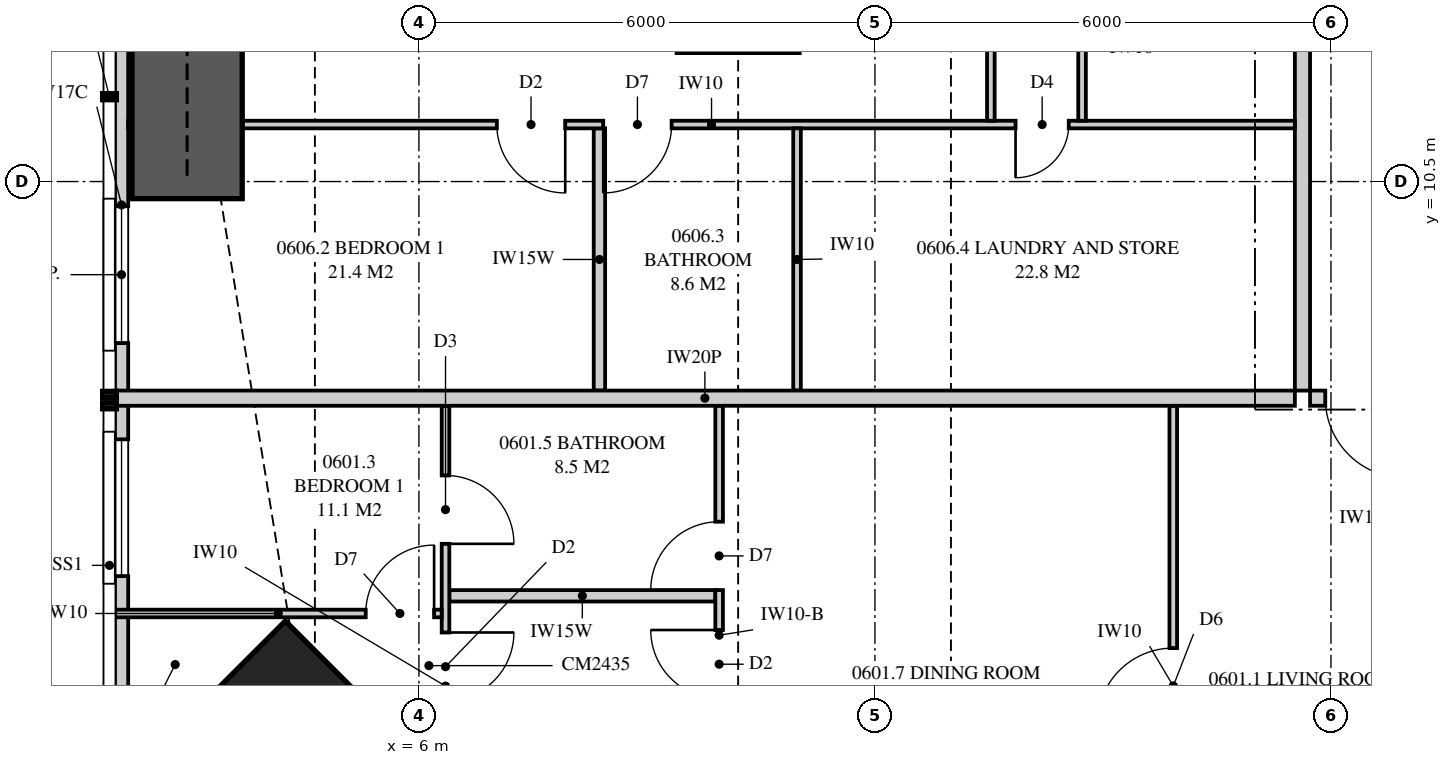
"""IFC4 building model, lengths in metres.
Left out: names, types, materials, properties, quantities, classifications, styles, units other than length and angle.
Written with IfcOpenShell. Run it as: python <this file> out.ifc"""

import sys

from ifc_helpers import new_model, si_unit, direction, frame, frame_2d, origin, origin_2d, place, context, subcontext, project, spatial, polyline, rectangle, outline, extrude, element, fill, save


model = new_model("IFC4")
c1 = context("Model", 3, precision=1e-05, world=origin(), true_north=direction((0.0, 1.0)))
c2 = subcontext(c1, "Body", "Model", "MODEL_VIEW")
j1 = project(units=[si_unit("LENGTHUNIT", "METRE"), si_unit("PLANEANGLEUNIT", "RADIAN")], contexts=[c1])
p1 = place(None, origin())
s1 = spatial("IfcSite", under=j1, at=p1, CompositionType="ELEMENT")
p2 = place(p1, origin())
s2 = spatial("IfcBuilding", under=s1, at=p2, CompositionType="ELEMENT")
p3 = place(p2, frame((0.0, 0.0, 27.7)))
s3 = spatial("IfcBuildingStorey", under=s2, at=p3, CompositionType="ELEMENT", Elevation=27.7)
p4 = place(p3, frame((4.631, 2.631, 0.0), z_axis=(0.0, 0.0, 1.0), x_axis=(0.707106781187, 0.707106781187, 0.0)))
e1 = element("IfcColumn", 1, at=p4, inside=s3, PredefinedType="COLUMN", context=c2, shape_type="SweptSolid", body=[
    extrude(rectangle(XDim=2.4, YDim=3.5, at=origin_2d()), origin(), (0.0, 0.0, 1.0), 3.35),
])
p5 = place(p3, frame((2.087, 17.333, 0.0), z_axis=(0.0, 0.0, 1.0), x_axis=(0.0, -1.0, 0.0)))
e2 = element("IfcWall", 2, at=p5, inside=s3, PredefinedType="SOLIDWALL", context=c2, shape_type="SweptSolid", body=[
    extrude(outline(polyline([(0.0, 0.0), (14.282, 0.0), (14.282, 3.11), (4.552, 3.11), (4.552, 2.15), (4.459, 2.15), (4.459, 3.11), (4.333, 3.11), (4.333, 2.15), (0.0, 2.15), (0.0, 0.0)])), frame((0.0, 0.087, 0.0), z_axis=(0.0, -1.0, 0.0), x_axis=(1.0, 0.0, 0.0)), (0.0, 0.0, 1.0), 0.175),
])
p6 = place(p5, frame((0.3, 0.0, 0.4)))
e3 = element("IfcOpeningElement", 3, at=p6, cuts=e2, PredefinedType="OPENING", context=c2, shape_type="SweptSolid", body=[
    extrude(rectangle(XDim=1.2, YDim=1.7, at=frame_2d((0.6, 0.85))), frame((0.0, 0.097, 0.0), z_axis=(0.0, -1.0, 0.0), x_axis=(1.0, 0.0, 0.0)), (0.0, 0.0, 1.0), 0.195),
])
p7 = place(p5, frame((7.158, 0.0, 0.4)))
e4 = element("IfcOpeningElement", 4, at=p7, cuts=e2, PredefinedType="OPENING", context=c2, shape_type="SweptSolid", body=[
    extrude(rectangle(XDim=1.8, YDim=1.7, at=frame_2d((0.9, 0.85))), frame((0.0, 0.097, 0.0), z_axis=(0.0, -1.0, 0.0), x_axis=(1.0, 0.0, 0.0)), (0.0, 0.0, 1.0), 0.195),
])
p8 = place(p5, frame((10.225, 0.0, 0.4)))
e5 = element("IfcOpeningElement", 5, at=p8, cuts=e2, PredefinedType="OPENING", context=c2, shape_type="SweptSolid", body=[
    extrude(rectangle(XDim=1.8, YDim=1.7, at=frame_2d((0.9, 0.85))), frame((0.0, 0.097, 0.0), z_axis=(0.0, -1.0, 0.0), x_axis=(1.0, 0.0, 0.0)), (0.0, 0.0, 1.0), 0.195),
])
p9 = place(p3, frame((17.725, 7.65, 0.0), z_axis=(0.0, 0.0, 1.0), x_axis=(1.0, 0.0, 0.0)))
e6 = element("IfcWall", 6, at=p9, inside=s3, PredefinedType="PARTITIONING", context=c2, shape_type="SweptSolid", body=[
    extrude(rectangle(XDim=4.125, YDim=0.2, at=frame_2d((2.062, 0.0))), origin(), (0.0, 0.0, 1.0), 3.11),
])
p10 = place(p9, frame((0.2, 0.0, 0.0)))
e7 = element("IfcOpeningElement", 7, at=p10, cuts=e6, PredefinedType="OPENING", context=c2, shape_type="SweptSolid", body=[
    extrude(rectangle(XDim=1.05, YDim=2.2, at=frame_2d((0.525, 1.1))), frame((0.0, 0.11, 0.0), z_axis=(0.0, -1.0, 0.0), x_axis=(1.0, 0.0, 0.0)), (0.0, 0.0, 1.0), 0.22),
])
p11 = place(p3, frame((6.35, 0.175, 0.0), z_axis=(0.0, 0.0, 1.0), x_axis=(0.0, 1.0, 0.0)))
e8 = element("IfcWall", 8, at=p11, inside=s3, PredefinedType="PARTITIONING", context=c2, shape_type="SweptSolid", body=[
    extrude(outline(polyline([(0.0, 0.0), (7.375, 0.0), (7.375, 3.11), (2.988, 3.11), (2.988, 2.15), (1.234, 2.15), (1.234, 3.11), (0.0, 3.11), (0.0, 0.0)])), frame((0.0, 0.05, 0.0), z_axis=(0.0, -1.0, 0.0), x_axis=(1.0, 0.0, 0.0)), (0.0, 0.0, 1.0), 0.1),
])
p12 = place(p11, frame((3.492, 0.0, 0.0)))
e9 = element("IfcOpeningElement", 9, at=p12, cuts=e8, PredefinedType="OPENING", context=c2, shape_type="SweptSolid", body=[
    extrude(rectangle(XDim=0.9, YDim=2.1, at=frame_2d((0.45, 1.05))), frame((0.0, 0.06, 0.0), z_axis=(0.0, -1.0, 0.0), x_axis=(1.0, 0.0, 0.0)), (0.0, 0.0, 1.0), 0.12),
])
p13 = place(p11, frame((5.559, 0.0, 0.0)))
e10 = element("IfcOpeningElement", 10, at=p13, cuts=e8, PredefinedType="OPENING", context=c2, shape_type="SweptSolid", body=[
    extrude(rectangle(XDim=0.9, YDim=2.1, at=frame_2d((0.45, 1.05))), frame((0.0, 0.06, 0.0), z_axis=(0.0, -1.0, 0.0), x_axis=(1.0, 0.0, 0.0)), (0.0, 0.0, 1.0), 0.12),
])
p14 = place(p3, frame((9.95, 1.513, 0.0), z_axis=(0.0, 0.0, 1.0), x_axis=(0.0, 1.0, 0.0)))
e11 = element("IfcWall", 11, at=p14, inside=s3, PredefinedType="PARTITIONING", context=c2, shape_type="SweptSolid", body=[
    extrude(outline(polyline([(0.0, 0.0), (6.037, 0.0), (6.037, 2.51), (0.927, 2.51), (0.927, 2.15), (0.0, 2.15), (0.0, 0.0)])), frame((0.0, 0.05, 0.0), z_axis=(0.0, -1.0, 0.0), x_axis=(1.0, 0.0, 0.0)), (0.0, 0.0, 1.0), 0.1),
])
p15 = place(p14, frame((2.188, 0.0, 0.0)))
e12 = element("IfcOpeningElement", 12, at=p15, cuts=e11, PredefinedType="OPENING", context=c2, shape_type="SweptSolid", body=[
    extrude(rectangle(XDim=0.9, YDim=2.1, at=frame_2d((0.45, 1.05))), frame((0.0, 0.06, 0.0), z_axis=(0.0, -1.0, 0.0), x_axis=(1.0, 0.0, 0.0)), (0.0, 0.0, 1.0), 0.12),
])
p16 = place(p14, frame((3.612, 0.0, 0.0)))
e13 = element("IfcOpeningElement", 13, at=p16, cuts=e11, PredefinedType="OPENING", context=c2, shape_type="SweptSolid", body=[
    extrude(rectangle(XDim=0.9, YDim=2.1, at=frame_2d((0.45, 1.05))), frame((0.0, 0.06, 0.0), z_axis=(0.0, -1.0, 0.0), x_axis=(1.0, 0.0, 0.0)), (0.0, 0.0, 1.0), 0.12),
])
p17 = place(p3, frame((2.0, 4.817, 0.0), z_axis=(0.0, 0.0, 1.0), x_axis=(1.0, 0.0, 0.0)))
e14 = element("IfcWall", 14, at=p17, inside=s3, PredefinedType="PARTITIONING", context=c2, shape_type="SweptSolid", body=[
    extrude(outline(polyline([(0.0, 0.0), (4.3, 0.0), (4.3, 3.11), (3.148, 3.11), (3.148, 2.15), (1.406, 2.15), (1.406, 3.11), (0.0, 3.11), (0.0, 0.0)])), frame((0.0, 0.05, 0.0), z_axis=(0.0, -1.0, 0.0), x_axis=(1.0, 0.0, 0.0)), (0.0, 0.0, 1.0), 0.1),
])
p18 = place(p17, frame((3.3, 0.0, 0.0)))
e15 = element("IfcOpeningElement", 15, at=p18, cuts=e14, PredefinedType="OPENING", context=c2, shape_type="SweptSolid", body=[
    extrude(rectangle(XDim=0.9, YDim=2.1, at=frame_2d((0.45, 1.05))), frame((0.0, 0.06, 0.0), z_axis=(0.0, -1.0, 0.0), x_axis=(1.0, 0.0, 0.0)), (0.0, 0.0, 1.0), 0.12),
])
p19 = place(p3, frame((6.4, 5.05, 0.0), z_axis=(0.0, 0.0, 1.0), x_axis=(1.0, 0.0, 0.0)))
e16 = element("IfcWall", 16, at=p19, inside=s3, PredefinedType="PLUMBINGWALL", context=c2, shape_type="SweptSolid", body=[
    extrude(outline(polyline([(0.0, 0.0), (3.5, 0.0), (3.5, 3.11), (3.5, 2.51), (2.515, 2.51), (2.515, 3.11), (0.0, 3.11), (0.0, 0.0)])), frame((0.0, 0.075, 0.0), z_axis=(0.0, -1.0, 0.0), x_axis=(1.0, 0.0, 0.0)), (0.0, 0.0, 1.0), 0.15),
])
p20 = place(p3, frame((15.925, 0.175, 0.0), z_axis=(0.0, 0.0, 1.0), x_axis=(0.0, 1.0, 0.0)))
e17 = element("IfcWall", 17, at=p20, inside=s3, PredefinedType="PARTITIONING", context=c2, shape_type="SweptSolid", body=[
    extrude(outline(polyline([(0.0, 0.0), (7.375, 0.0), (7.375, 3.11), (1.635, 3.11), (1.635, 2.15), (0.0, 2.15), (0.0, 3.11), (0.0, 0.0)])), frame((0.0, 0.05, 0.0), z_axis=(0.0, -1.0, 0.0), x_axis=(1.0, 0.0, 0.0)), (0.0, 0.0, 1.0), 0.1),
])
p21 = place(p20, frame((3.188, 0.0, 0.0)))
e18 = element("IfcOpeningElement", 18, at=p21, cuts=e17, PredefinedType="OPENING", context=c2, shape_type="SweptSolid", body=[
    extrude(rectangle(XDim=1.0, YDim=2.1, at=frame_2d((0.5, 1.05))), frame((0.0, 0.06, 0.0), z_axis=(0.0, -1.0, 0.0), x_axis=(1.0, 0.0, 0.0)), (0.0, 0.0, 1.0), 0.12),
])
p22 = place(p3, frame((2.0, 7.65, 0.0), z_axis=(0.0, 0.0, 1.0), x_axis=(1.0, 0.0, 0.0)))
e19 = element("IfcWall", 19, at=p22, inside=s3, PredefinedType="PARTITIONING", context=c2, shape_type="SweptSolid", body=[
    extrude(outline(polyline([(0.0, 0.0), (15.525, 0.0), (15.525, 3.11), (11.337, 3.11), (11.337, 2.541), (10.663, 2.541), (10.663, 3.11), (9.51, 3.11), (9.51, 2.51), (6.89, 2.51), (6.89, 3.11), (2.969, 3.11), (2.969, 2.541), (2.74, 2.541), (2.74, 2.15), (0.896, 2.15), (0.896, 3.11), (0.0, 3.11), (0.0, 0.0)])), frame((0.0, 0.1, 0.0), z_axis=(0.0, -1.0, 0.0), x_axis=(1.0, 0.0, 0.0)), (0.0, 0.0, 1.0), 0.2),
])
p23 = place(p3, frame((17.625, 7.75, 0.0), z_axis=(0.0, 0.0, 1.0), x_axis=(0.0, 1.0, 0.0)))
e20 = element("IfcWall", 20, at=p23, inside=s3, PredefinedType="PARTITIONING", context=c2, shape_type="SweptSolid", body=[
    extrude(outline(polyline([(0.0, 0.0), (9.35, 0.0), (9.35, 3.11), (5.587, 3.11), (5.587, 2.541), (4.913, 2.541), (4.913, 3.11), (0.0, 3.11), (0.0, 0.0)])), frame((0.0, 0.1, 0.0), z_axis=(0.0, -1.0, 0.0), x_axis=(1.0, 0.0, 0.0)), (0.0, 0.0, 1.0), 0.2),
])
p24 = place(p3, frame((2.175, 11.25, 0.0), z_axis=(0.0, 0.0, 1.0), x_axis=(1.0, 0.0, 0.0)))
e21 = element("IfcWall", 21, at=p24, inside=s3, PredefinedType="PARTITIONING", context=c2, shape_type="SweptSolid", body=[
    extrude(outline(polyline([(0.188, 3.11), (0.0, 3.11), (0.0, 0.0), (0.529, 0.0), (0.529, 0.263), (1.021, 0.263), (1.021, 0.0), (15.35, 0.0), (15.35, 3.11), (11.112, 3.11), (11.112, 2.541), (10.538, 2.541), (10.538, 3.11), (9.285, 3.11), (9.285, 2.51), (6.765, 2.51), (6.765, 3.11), (2.744, 3.11), (2.744, 2.541), (2.169, 2.541), (2.169, 3.11), (1.93, 3.11), (1.93, 2.15), (1.021, 2.15), (1.021, 1.887), (0.529, 1.887), (0.529, 2.15), (0.188, 2.15), (0.188, 3.11)])), frame((0.0, 0.05, 0.0), z_axis=(0.0, -1.0, 0.0), x_axis=(1.0, 0.0, 0.0)), (0.0, 0.0, 1.0), 0.1),
])
p25 = place(p24, frame((4.85, 0.0, 0.0)))
e22 = element("IfcOpeningElement", 22, at=p25, cuts=e21, PredefinedType="OPENING", context=c2, shape_type="SweptSolid", body=[
    extrude(rectangle(XDim=0.9, YDim=2.1, at=frame_2d((0.45, 1.05))), frame((0.0, 0.06, 0.0), z_axis=(0.0, -1.0, 0.0), x_axis=(1.0, 0.0, 0.0)), (0.0, 0.0, 1.0), 0.12),
])
p26 = place(p24, frame((6.25, 0.0, 0.0)))
e23 = element("IfcOpeningElement", 23, at=p26, cuts=e21, PredefinedType="OPENING", context=c2, shape_type="SweptSolid", body=[
    extrude(rectangle(XDim=0.9, YDim=2.1, at=frame_2d((0.45, 1.05))), frame((0.0, 0.06, 0.0), z_axis=(0.0, -1.0, 0.0), x_axis=(1.0, 0.0, 0.0)), (0.0, 0.0, 1.0), 0.12),
])
p27 = place(p24, frame((11.675, 0.0, 0.0)))
e24 = element("IfcOpeningElement", 24, at=p27, cuts=e21, PredefinedType="OPENING", context=c2, shape_type="SweptSolid", body=[
    extrude(rectangle(XDim=0.7, YDim=2.1, at=frame_2d((0.35, 1.05))), frame((0.0, 0.06, 0.0), z_axis=(0.0, -1.0, 0.0), x_axis=(1.0, 0.0, 0.0)), (0.0, 0.0, 1.0), 0.12),
])
p28 = place(p3, frame((8.375, 7.75, 0.0), z_axis=(0.0, 0.0, 1.0), x_axis=(0.0, 1.0, 0.0)))
e25 = element("IfcWall", 25, at=p28, inside=s3, PredefinedType="PLUMBINGWALL", context=c2, shape_type="SweptSolid", body=[
    extrude(rectangle(XDim=3.45, YDim=0.15, at=frame_2d((1.725, 0.0))), origin(), (0.0, 0.0, 1.0), 3.11),
])
p29 = place(p3, frame((10.975, 7.75, 0.0), z_axis=(0.0, 0.0, 1.0), x_axis=(0.0, 1.0, 0.0)))
e26 = element("IfcWall", 26, at=p29, inside=s3, PredefinedType="PARTITIONING", context=c2, shape_type="SweptSolid", body=[
    extrude(outline(polyline([(0.0, 0.0), (3.45, 0.0), (3.45, 3.11), (3.45, 2.51), (0.0, 2.51), (0.0, 3.11), (0.0, 0.0)])), frame((0.0, 0.05, 0.0), z_axis=(0.0, -1.0, 0.0), x_axis=(1.0, 0.0, 0.0)), (0.0, 0.0, 1.0), 0.1),
])
p30 = place(p3, frame((13.525, 11.3, 0.0), z_axis=(0.0, 0.0, 1.0), x_axis=(0.0, 1.0, 0.0)))
e27 = element("IfcWall", 27, at=p30, inside=s3, PredefinedType="PARTITIONING", context=c2, shape_type="SweptSolid", body=[
    extrude(outline(polyline([(0.0, 0.0), (17.95, 0.0), (17.95, 3.11), (13.987, 3.11), (13.987, 2.541), (13.413, 2.541), (13.413, 3.11), (1.987, 3.11), (1.987, 2.541), (1.413, 2.541), (1.413, 3.11), (0.0, 3.11), (0.0, 0.0)])), frame((0.0, 0.05, 0.0), z_axis=(0.0, -1.0, 0.0), x_axis=(1.0, 0.0, 0.0)), (0.0, 0.0, 1.0), 0.1),
])
p31 = place(p30, frame((6.7, 0.0, 0.0)))
e28 = element("IfcOpeningElement", 28, at=p31, cuts=e27, PredefinedType="OPENING", context=c2, shape_type="SweptSolid", body=[
    extrude(rectangle(XDim=1.0, YDim=2.1, at=frame_2d((0.5, 1.05))), frame((0.0, 0.06, 0.0), z_axis=(0.0, -1.0, 0.0), x_axis=(1.0, 0.0, 0.0)), (0.0, 0.0, 1.0), 0.12),
])
p32 = place(p3, frame((14.725, 11.3, 0.0), z_axis=(0.0, 0.0, 1.0), x_axis=(0.0, 1.0, 0.0)))
e29 = element("IfcWall", 29, at=p32, inside=s3, PredefinedType="PARTITIONING", context=c2, shape_type="SweptSolid", body=[
    extrude(outline(polyline([(0.0, 0.0), (4.15, 0.0), (4.15, 3.11), (1.987, 3.11), (1.987, 2.541), (1.413, 2.541), (1.413, 3.11), (0.0, 3.11), (0.0, 0.0)])), frame((0.0, 0.05, 0.0), z_axis=(0.0, -1.0, 0.0), x_axis=(1.0, 0.0, 0.0)), (0.0, 0.0, 1.0), 0.1),
])
p33 = place(p3, frame((2.95, 10.275, 0.0), z_axis=(0.0, 0.0, 1.0), x_axis=(0.0, 1.0, 0.0)))
e30 = element("IfcWall", 30, at=p33, inside=s3, PredefinedType="SHEAR", context=c2, shape_type="SweptSolid", body=[
    extrude(rectangle(XDim=5.45, YDim=1.45, at=frame_2d((2.725, 0.0))), origin(), (0.0, 0.0, 1.0), 3.35),
])
p34 = place(p7, origin())
e31 = element("IfcWindow", 31, at=p34, inside=s3, PartitioningType="SINGLE_PANEL", PredefinedType="WINDOW", context=c2, shape_type="SweptSolid", body=[
    extrude(rectangle(XDim=1.8, YDim=1.7, at=frame_2d((0.9, 0.85))), frame((0.0, 0.03, 0.0), z_axis=(0.0, -1.0, 0.0), x_axis=(1.0, 0.0, 0.0)), (0.0, 0.0, 1.0), 0.06),
])
fill(e4, e31)
p35 = place(p8, origin())
e32 = element("IfcWindow", 32, at=p35, inside=s3, PartitioningType="SINGLE_PANEL", PredefinedType="WINDOW", context=c2, shape_type="SweptSolid", body=[
    extrude(rectangle(XDim=1.8, YDim=1.7, at=frame_2d((0.9, 0.85))), frame((0.0, 0.03, 0.0), z_axis=(0.0, -1.0, 0.0), x_axis=(1.0, 0.0, 0.0)), (0.0, 0.0, 1.0), 0.06),
])
fill(e5, e32)
p36 = place(p10, frame((1.05, 0.0, 0.0), z_axis=(0.0, 0.0, 1.0), x_axis=(-1.0, 0.0, 0.0)))
e33 = element("IfcDoor", 33, at=p36, inside=s3, OperationType="SINGLE_SWING_LEFT", PredefinedType="DOOR", context=c2, shape_type="SweptSolid", body=[
    extrude(rectangle(XDim=1.05, YDim=2.2, at=frame_2d((0.525, 1.1))), frame((0.0, 0.025, 0.0), z_axis=(0.0, -1.0, 0.0), x_axis=(1.0, 0.0, 0.0)), (0.0, 0.0, 1.0), 0.05),
])
fill(e7, e33)
p37 = place(p18, origin())
e34 = element("IfcDoor", 34, at=p37, inside=s3, OperationType="SINGLE_SWING_RIGHT", PredefinedType="DOOR", context=c2, shape_type="SweptSolid", body=[
    extrude(rectangle(XDim=0.9, YDim=2.1, at=frame_2d((0.45, 1.05))), frame((0.0, 0.025, 0.0), z_axis=(0.0, -1.0, 0.0), x_axis=(1.0, 0.0, 0.0)), (0.0, 0.0, 1.0), 0.05),
])
fill(e15, e34)
p38 = place(p12, frame((0.9, 0.0, 0.0), z_axis=(0.0, 0.0, 1.0), x_axis=(-1.0, 0.0, 0.0)))
e35 = element("IfcDoor", 35, at=p38, inside=s3, OperationType="SINGLE_SWING_LEFT", PredefinedType="DOOR", context=c2, shape_type="SweptSolid", body=[
    extrude(rectangle(XDim=0.9, YDim=2.1, at=frame_2d((0.45, 1.05))), frame((0.0, 0.025, 0.0), z_axis=(0.0, -1.0, 0.0), x_axis=(1.0, 0.0, 0.0)), (0.0, 0.0, 1.0), 0.05),
])
fill(e9, e35)
p39 = place(p15, origin())
e36 = element("IfcDoor", 36, at=p39, inside=s3, OperationType="SINGLE_SWING_RIGHT", PredefinedType="DOOR", context=c2, shape_type="SweptSolid", body=[
    extrude(rectangle(XDim=0.9, YDim=2.1, at=frame_2d((0.45, 1.05))), frame((0.0, 0.025, 0.0), z_axis=(0.0, -1.0, 0.0), x_axis=(1.0, 0.0, 0.0)), (0.0, 0.0, 1.0), 0.05),
])
fill(e12, e36)
p40 = place(p16, origin())
e37 = element("IfcDoor", 37, at=p40, inside=s3, OperationType="SINGLE_SWING_LEFT", PredefinedType="DOOR", context=c2, shape_type="SweptSolid", body=[
    extrude(rectangle(XDim=0.9, YDim=2.1, at=frame_2d((0.45, 1.05))), frame((0.0, 0.025, 0.0), z_axis=(0.0, -1.0, 0.0), x_axis=(1.0, 0.0, 0.0)), (0.0, 0.0, 1.0), 0.05),
])
fill(e13, e37)
p41 = place(p13, frame((0.9, 0.0, 0.0), z_axis=(0.0, 0.0, 1.0), x_axis=(-1.0, 0.0, 0.0)))
e38 = element("IfcDoor", 38, at=p41, inside=s3, OperationType="SINGLE_SWING_RIGHT", PredefinedType="DOOR", context=c2, shape_type="SweptSolid", body=[
    extrude(rectangle(XDim=0.9, YDim=2.1, at=frame_2d((0.45, 1.05))), frame((0.0, 0.025, 0.0), z_axis=(0.0, -1.0, 0.0), x_axis=(1.0, 0.0, 0.0)), (0.0, 0.0, 1.0), 0.05),
])
fill(e10, e38)
p42 = place(p21, origin())
e39 = element("IfcDoor", 39, at=p42, inside=s3, OperationType="SINGLE_SWING_LEFT", PredefinedType="DOOR", context=c2, shape_type="SweptSolid", body=[
    extrude(rectangle(XDim=1.0, YDim=2.1, at=frame_2d((0.5, 1.05))), frame((0.0, 0.025, 0.0), z_axis=(0.0, -1.0, 0.0), x_axis=(1.0, 0.0, 0.0)), (0.0, 0.0, 1.0), 0.05),
])
fill(e18, e39)
p43 = place(p25, frame((0.9, 0.0, 0.0), z_axis=(0.0, 0.0, 1.0), x_axis=(-1.0, 0.0, 0.0)))
e40 = element("IfcDoor", 40, at=p43, inside=s3, OperationType="SINGLE_SWING_LEFT", PredefinedType="DOOR", context=c2, shape_type="SweptSolid", body=[
    extrude(rectangle(XDim=0.9, YDim=2.1, at=frame_2d((0.45, 1.05))), frame((0.0, 0.025, 0.0), z_axis=(0.0, -1.0, 0.0), x_axis=(1.0, 0.0, 0.0)), (0.0, 0.0, 1.0), 0.05),
])
fill(e22, e40)
p44 = place(p26, frame((0.9, 0.0, 0.0), z_axis=(0.0, 0.0, 1.0), x_axis=(-1.0, 0.0, 0.0)))
e41 = element("IfcDoor", 41, at=p44, inside=s3, OperationType="SINGLE_SWING_RIGHT", PredefinedType="DOOR", context=c2, shape_type="SweptSolid", body=[
    extrude(rectangle(XDim=0.9, YDim=2.1, at=frame_2d((0.45, 1.05))), frame((0.0, 0.025, 0.0), z_axis=(0.0, -1.0, 0.0), x_axis=(1.0, 0.0, 0.0)), (0.0, 0.0, 1.0), 0.05),
])
fill(e23, e41)
p45 = place(p27, frame((0.7, 0.0, 0.0), z_axis=(0.0, 0.0, 1.0), x_axis=(-1.0, 0.0, 0.0)))
e42 = element("IfcDoor", 42, at=p45, inside=s3, OperationType="SINGLE_SWING_RIGHT", PredefinedType="DOOR", context=c2, shape_type="SweptSolid", body=[
    extrude(rectangle(XDim=0.7, YDim=2.1, at=frame_2d((0.35, 1.05))), frame((0.0, 0.025, 0.0), z_axis=(0.0, -1.0, 0.0), x_axis=(1.0, 0.0, 0.0)), (0.0, 0.0, 1.0), 0.05),
])
fill(e24, e42)
save(model, sys.argv[1])
